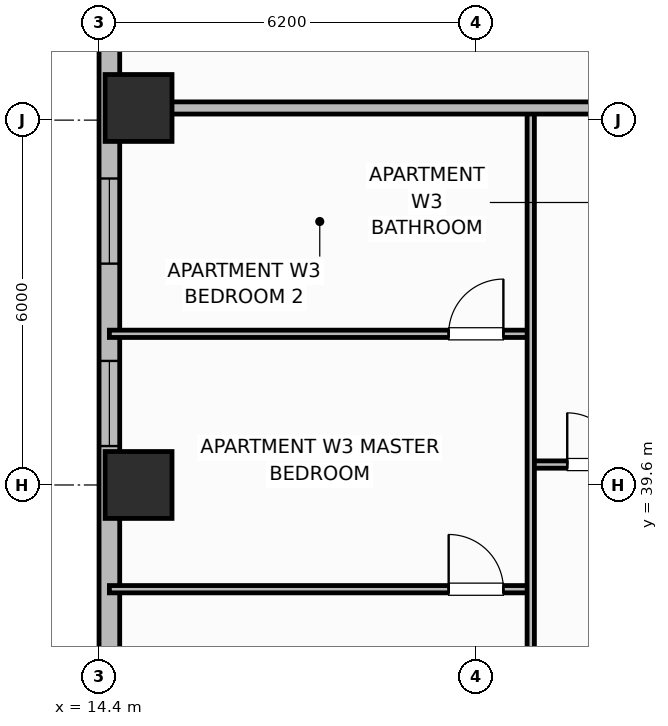
"""IFC4 building model, lengths in metres.
Left out: names, types, materials, properties, quantities, classifications, styles, units other than length and angle.
Written with IfcOpenShell. Run it as: python <this file> out.ifc"""

import sys

from ifc_helpers import new_model, si_unit, direction, frame, frame_2d, origin, origin_2d, place, context, subcontext, project, spatial, rectangle, extrude, element, fill, save


model = new_model("IFC4")
c1 = context("Model", 3, precision=1e-05, world=origin(), true_north=direction((0.0, 1.0)))
c2 = subcontext(c1, "Body", "Model", "MODEL_VIEW")
j1 = project(units=[si_unit("LENGTHUNIT", "METRE"), si_unit("PLANEANGLEUNIT", "RADIAN")], contexts=[c1])
p1 = place(None, origin())
s1 = spatial("IfcSite", under=j1, at=p1, CompositionType="ELEMENT")
p2 = place(p1, origin())
s2 = spatial("IfcBuilding", under=s1, at=p2, CompositionType="ELEMENT")
p3 = place(p2, frame((0.0, 0.0, 106.8)))
s3 = spatial("IfcBuildingStorey", under=s2, at=p3, CompositionType="ELEMENT", Elevation=106.8)
for number, where, z_axis, x_axis in (
    (1, (15.05, 39.6, 0.0), (0.0, 0.0, 1.0), (1.0, 0.0, 0.0)),
    (2, (15.05, 45.8, 0.0), (0.0, 0.0, 1.0), (1.0, 0.0, 0.0)),
):
    element("IfcColumn", number, at=place(p3, frame(where, z_axis=z_axis, x_axis=x_axis)), inside=s3, PredefinedType="COLUMN", context=c2, shape_type="SweptSolid", body=[
        extrude(rectangle(XDim=1.1, YDim=1.1, at=origin_2d()), origin(), (0.0, 0.0, 1.0), 3.7),
    ])
p4 = place(p3, frame((14.57, 47.4, 0.0), z_axis=(0.0, 0.0, 1.0), x_axis=(0.0, -1.0, 0.0)))
e3 = element("IfcWall", 3, at=p4, inside=s3, PredefinedType="SOLIDWALL", context=c2, shape_type="SweptSolid", body=[
    extrude(rectangle(XDim=14.8, YDim=0.34, at=frame_2d((7.4, 0.0))), origin(), (0.0, 0.0, 1.0), 2.7),
])
p5 = place(p4, frame((2.76, 0.0, 0.69)))
e4 = element("IfcOpeningElement", 4, at=p5, cuts=e3, PredefinedType="OPENING", context=c2, shape_type="SweptSolid", body=[
    extrude(rectangle(XDim=1.4, YDim=1.85, at=frame_2d((0.7, 0.925))), frame((0.0, 0.18, 0.0), z_axis=(0.0, -1.0, 0.0), x_axis=(1.0, 0.0, 0.0)), (0.0, 0.0, 1.0), 0.36),
])
p6 = place(p4, frame((5.76, 0.0, 0.69)))
e5 = element("IfcOpeningElement", 5, at=p6, cuts=e3, PredefinedType="OPENING", context=c2, shape_type="SweptSolid", body=[
    extrude(rectangle(XDim=1.4, YDim=1.85, at=frame_2d((0.7, 0.925))), frame((0.0, 0.18, 0.0), z_axis=(0.0, -1.0, 0.0), x_axis=(1.0, 0.0, 0.0)), (0.0, 0.0, 1.0), 0.36),
])
p7 = place(p4, frame((10.512, 0.0, 0.73)))
e6 = element("IfcOpeningElement", 6, at=p7, cuts=e3, PredefinedType="OPENING", context=c2, shape_type="SweptSolid", body=[
    extrude(rectangle(XDim=1.8, YDim=1.85, at=frame_2d((0.9, 0.925))), frame((0.0, 0.18, 0.0), z_axis=(0.0, -1.0, 0.0), x_axis=(1.0, 0.0, 0.0)), (0.0, 0.0, 1.0), 0.36),
])
p8 = place(p3, frame((21.5, 39.936, 0.0), z_axis=(0.0, 0.0, 1.0), x_axis=(1.0, 0.0, 0.0)))
e7 = element("IfcWall", 7, at=p8, inside=s3, PredefinedType="PARTITIONING", context=c2, shape_type="SweptSolid", body=[
    extrude(rectangle(XDim=2.25, YDim=0.12, at=frame_2d((1.125, 0.0))), origin(), (0.0, 0.0, 1.0), 2.53),
])
p9 = place(p8, frame((0.6, 0.0, 0.0)))
e8 = element("IfcOpeningElement", 8, at=p9, cuts=e7, PredefinedType="OPENING", context=c2, shape_type="SweptSolid", body=[
    extrude(rectangle(XDim=0.85, YDim=2.1, at=frame_2d((0.425, 1.05))), frame((0.0, 0.07, 0.0), z_axis=(0.0, -1.0, 0.0), x_axis=(1.0, 0.0, 0.0)), (0.0, 0.0, 1.0), 0.14),
])
p10 = place(p3, frame((14.57, 37.886, 0.0), z_axis=(0.0, 0.0, 1.0), x_axis=(1.0, 0.0, 0.0)))
e9 = element("IfcWall", 9, at=p10, inside=s3, PredefinedType="PARTITIONING", context=c2, shape_type="SweptSolid", body=[
    extrude(rectangle(XDim=6.93, YDim=0.12, at=frame_2d((3.465, 0.0))), origin(), (0.0, 0.0, 1.0), 2.53),
])
p11 = place(p10, frame((5.58, 0.0, 0.0)))
e10 = element("IfcOpeningElement", 10, at=p11, cuts=e9, PredefinedType="OPENING", context=c2, shape_type="SweptSolid", body=[
    extrude(rectangle(XDim=0.9, YDim=2.1, at=frame_2d((0.45, 1.05))), frame((0.0, 0.07, 0.0), z_axis=(0.0, -1.0, 0.0), x_axis=(1.0, 0.0, 0.0)), (0.0, 0.0, 1.0), 0.14),
])
p12 = place(p3, frame((14.57, 42.086, 0.0), z_axis=(0.0, 0.0, 1.0), x_axis=(1.0, 0.0, 0.0)))
e11 = element("IfcWall", 11, at=p12, inside=s3, PredefinedType="PARTITIONING", context=c2, shape_type="SweptSolid", body=[
    extrude(rectangle(XDim=6.93, YDim=0.12, at=frame_2d((3.465, 0.0))), origin(), (0.0, 0.0, 1.0), 2.53),
])
p13 = place(p12, frame((5.58, 0.0, 0.0)))
e12 = element("IfcOpeningElement", 12, at=p13, cuts=e11, PredefinedType="OPENING", context=c2, shape_type="SweptSolid", body=[
    extrude(rectangle(XDim=0.9, YDim=2.1, at=frame_2d((0.45, 1.05))), frame((0.0, 0.07, 0.0), z_axis=(0.0, -1.0, 0.0), x_axis=(1.0, 0.0, 0.0)), (0.0, 0.0, 1.0), 0.14),
])
p14 = place(p3, frame((21.5, 34.576, 0.0), z_axis=(0.0, 0.0, 1.0), x_axis=(0.0, 1.0, 0.0)))
e13 = element("IfcWall", 13, at=p14, inside=s3, PredefinedType="PARTITIONING", context=c2, shape_type="SweptSolid", body=[
    extrude(rectangle(XDim=11.184, YDim=0.12, at=frame_2d((5.592, 0.0))), origin(), (0.0, 0.0, 1.0), 2.53),
])
p15 = place(p14, frame((0.41, 0.0, 0.0)))
e14 = element("IfcOpeningElement", 14, at=p15, cuts=e13, PredefinedType="OPENING", context=c2, shape_type="SweptSolid", body=[
    extrude(rectangle(XDim=0.9, YDim=2.1, at=frame_2d((0.45, 1.05))), frame((0.0, 0.07, 0.0), z_axis=(0.0, -1.0, 0.0), x_axis=(1.0, 0.0, 0.0)), (0.0, 0.0, 1.0), 0.14),
])
p16 = place(p3, frame((14.99, 45.8, 0.0), z_axis=(0.0, 0.0, 1.0), x_axis=(1.0, 0.0, 0.0)))
e15 = element("IfcWall", 15, at=p16, inside=s3, PredefinedType="PARTITIONING", context=c2, shape_type="SweptSolid", body=[
    extrude(rectangle(XDim=8.76, YDim=0.2, at=frame_2d((4.38, 0.0))), origin(), (0.0, 0.0, 1.0), 2.53),
])
p17 = place(p5, origin())
e16 = element("IfcWindow", 16, at=p17, inside=s3, PartitioningType="SINGLE_PANEL", PredefinedType="WINDOW", context=c2, shape_type="SweptSolid", body=[
    extrude(rectangle(XDim=1.4, YDim=1.85, at=frame_2d((0.7, 0.925))), frame((0.0, 0.03, 0.0), z_axis=(0.0, -1.0, 0.0), x_axis=(1.0, 0.0, 0.0)), (0.0, 0.0, 1.0), 0.06),
])
fill(e4, e16)
p18 = place(p6, origin())
e17 = element("IfcWindow", 17, at=p18, inside=s3, PartitioningType="SINGLE_PANEL", PredefinedType="WINDOW", context=c2, shape_type="SweptSolid", body=[
    extrude(rectangle(XDim=1.4, YDim=1.85, at=frame_2d((0.7, 0.925))), frame((0.0, 0.03, 0.0), z_axis=(0.0, -1.0, 0.0), x_axis=(1.0, 0.0, 0.0)), (0.0, 0.0, 1.0), 0.06),
])
fill(e5, e17)
p19 = place(p9, origin())
e18 = element("IfcDoor", 18, at=p19, inside=s3, OperationType="SINGLE_SWING_LEFT", PredefinedType="DOOR", context=c2, shape_type="SweptSolid", body=[
    extrude(rectangle(XDim=0.85, YDim=2.1, at=frame_2d((0.425, 1.05))), frame((0.0, 0.025, 0.0), z_axis=(0.0, -1.0, 0.0), x_axis=(1.0, 0.0, 0.0)), (0.0, 0.0, 1.0), 0.05),
])
fill(e8, e18)
p20 = place(p11, origin())
e19 = element("IfcDoor", 19, at=p20, inside=s3, OperationType="SINGLE_SWING_LEFT", PredefinedType="DOOR", context=c2, shape_type="SweptSolid", body=[
    extrude(rectangle(XDim=0.9, YDim=2.1, at=frame_2d((0.45, 1.05))), frame((0.0, 0.025, 0.0), z_axis=(0.0, -1.0, 0.0), x_axis=(1.0, 0.0, 0.0)), (0.0, 0.0, 1.0), 0.05),
])
fill(e10, e19)
p21 = place(p13, origin())
e20 = element("IfcDoor", 20, at=p21, inside=s3, OperationType="SINGLE_SWING_RIGHT", PredefinedType="DOOR", context=c2, shape_type="SweptSolid", body=[
    extrude(rectangle(XDim=0.9, YDim=2.1, at=frame_2d((0.45, 1.05))), frame((0.0, 0.025, 0.0), z_axis=(0.0, -1.0, 0.0), x_axis=(1.0, 0.0, 0.0)), (0.0, 0.0, 1.0), 0.05),
])
fill(e12, e20)
save(model, sys.argv[1])
